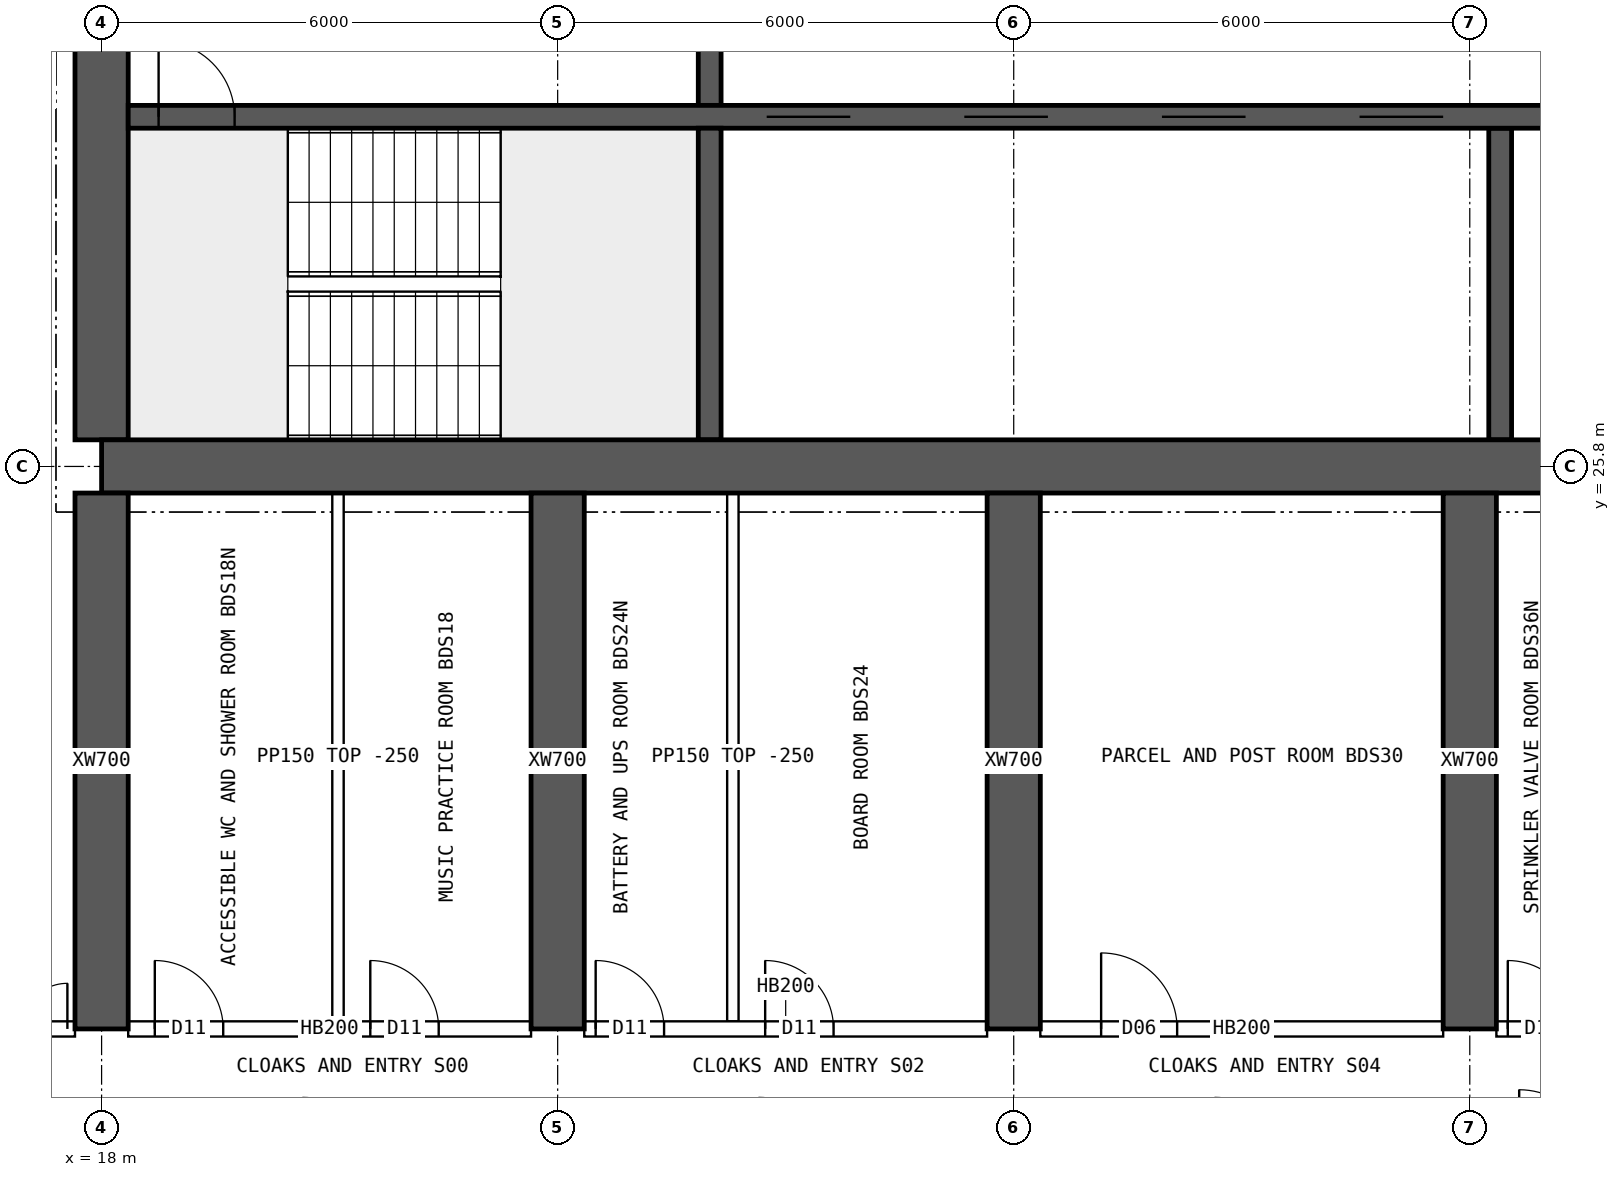
"""IFC4 building model, lengths in metres.
Left out: names, types, materials, properties, quantities, classifications, styles, units other than length and angle.
Written with IfcOpenShell. Run it as: python <this file> out.ifc"""

import sys

from ifc_helpers import new_model, si_unit, direction, frame, frame_2d, origin, place, context, subcontext, project, spatial, rectangle, extrude, element, fill, save


model = new_model("IFC4")
c1 = context("Model", 3, precision=1e-05, world=origin(), true_north=direction((0.0, 1.0)))
c2 = subcontext(c1, "Body", "Model", "MODEL_VIEW")
j1 = project(units=[si_unit("LENGTHUNIT", "METRE"), si_unit("PLANEANGLEUNIT", "RADIAN")], contexts=[c1])
p1 = place(None, origin())
s1 = spatial("IfcSite", under=j1, at=p1, CompositionType="ELEMENT")
p2 = place(p1, origin())
s2 = spatial("IfcBuilding", under=s1, at=p2, CompositionType="ELEMENT")
p3 = place(p2, frame((0.0, 0.0, 246.55)))
s3 = spatial("IfcBuildingStorey", under=s2, at=p3, CompositionType="ELEMENT", Elevation=246.55)
p4 = place(p3, frame((18.0, 25.8, 0.0), z_axis=(0.0, 0.0, 1.0), x_axis=(1.0, 0.0, 0.0)))
e1 = element("IfcWall", 1, at=p4, inside=s3, PredefinedType="SHEAR", context=c2, shape_type="SweptSolid", body=[
    extrude(rectangle(XDim=48.0, YDim=0.7, at=frame_2d((24.0, 0.0))), origin(), (0.0, 0.0, 1.0), 3.75),
])
p5 = place(p3, frame((18.0, 26.15, 0.0), z_axis=(0.0, 0.0, 1.0), x_axis=(0.0, 1.0, 0.0)))
e2 = element("IfcWall", 2, at=p5, inside=s3, PredefinedType="SHEAR", context=c2, shape_type="SweptSolid", body=[
    extrude(rectangle(XDim=11.7, YDim=0.7, at=frame_2d((5.85, 0.0))), origin(), (0.0, 0.0, 1.0), 3.75),
])
p6 = place(p5, frame((5.15, 0.0, 0.0)))
e3 = element("IfcOpeningElement", 3, at=p6, cuts=e2, PredefinedType="OPENING", context=c2, shape_type="SweptSolid", body=[
    extrude(rectangle(XDim=1.2, YDim=2.1, at=frame_2d((0.6, 1.05))), frame((0.0, 0.36, 0.0), z_axis=(0.0, -1.0, 0.0), x_axis=(1.0, 0.0, 0.0)), (0.0, 0.0, 1.0), 0.72),
])
p7 = place(p3, frame((18.35, 30.4, 0.0), z_axis=(0.0, 0.0, 1.0), x_axis=(1.0, 0.0, 0.0)))
e4 = element("IfcWall", 4, at=p7, inside=s3, PredefinedType="SHEAR", context=c2, shape_type="SweptSolid", body=[
    extrude(rectangle(XDim=47.3, YDim=0.3, at=frame_2d((23.65, 0.0))), origin(), (0.0, 0.0, 1.0), 3.75),
])
p8 = place(p7, frame((0.4, 0.0, 0.0)))
e5 = element("IfcOpeningElement", 5, at=p8, cuts=e4, PredefinedType="OPENING", context=c2, shape_type="SweptSolid", body=[
    extrude(rectangle(XDim=1.0, YDim=2.1, at=frame_2d((0.5, 1.05))), frame((0.0, 0.16, 0.0), z_axis=(0.0, -1.0, 0.0), x_axis=(1.0, 0.0, 0.0)), (0.0, 0.0, 1.0), 0.32),
])
p9 = place(p7, frame((45.9, 0.0, 0.0)))
e6 = element("IfcOpeningElement", 6, at=p9, cuts=e4, PredefinedType="OPENING", context=c2, shape_type="SweptSolid", body=[
    extrude(rectangle(XDim=1.0, YDim=2.1, at=frame_2d((0.5, 1.05))), frame((0.0, 0.16, 0.0), z_axis=(0.0, -1.0, 0.0), x_axis=(1.0, 0.0, 0.0)), (0.0, 0.0, 1.0), 0.32),
])
p10 = place(p7, frame((8.4, 0.0, 0.0)))
e7 = element("IfcOpeningElement", 7, at=p10, cuts=e4, PredefinedType="OPENING", context=c2, shape_type="SweptSolid", body=[
    extrude(rectangle(XDim=1.1, YDim=2.1, at=frame_2d((0.55, 1.05))), frame((0.0, 0.16, 0.0), z_axis=(0.0, -1.0, 0.0), x_axis=(1.0, 0.0, 0.0)), (0.0, 0.0, 1.0), 0.32),
])
p11 = place(p7, frame((11.0, 0.0, 0.0)))
e8 = element("IfcOpeningElement", 8, at=p11, cuts=e4, PredefinedType="OPENING", context=c2, shape_type="SweptSolid", body=[
    extrude(rectangle(XDim=1.1, YDim=2.1, at=frame_2d((0.55, 1.05))), frame((0.0, 0.16, 0.0), z_axis=(0.0, -1.0, 0.0), x_axis=(1.0, 0.0, 0.0)), (0.0, 0.0, 1.0), 0.32),
])
p12 = place(p7, frame((13.6, 0.0, 0.0)))
e9 = element("IfcOpeningElement", 9, at=p12, cuts=e4, PredefinedType="OPENING", context=c2, shape_type="SweptSolid", body=[
    extrude(rectangle(XDim=1.1, YDim=2.1, at=frame_2d((0.55, 1.05))), frame((0.0, 0.16, 0.0), z_axis=(0.0, -1.0, 0.0), x_axis=(1.0, 0.0, 0.0)), (0.0, 0.0, 1.0), 0.32),
])
p13 = place(p7, frame((16.2, 0.0, 0.0)))
e10 = element("IfcOpeningElement", 10, at=p13, cuts=e4, PredefinedType="OPENING", context=c2, shape_type="SweptSolid", body=[
    extrude(rectangle(XDim=1.1, YDim=2.1, at=frame_2d((0.55, 1.05))), frame((0.0, 0.16, 0.0), z_axis=(0.0, -1.0, 0.0), x_axis=(1.0, 0.0, 0.0)), (0.0, 0.0, 1.0), 0.32),
])
p14 = place(p7, frame((18.975, 0.0, 0.0)))
e11 = element("IfcOpeningElement", 11, at=p14, cuts=e4, PredefinedType="OPENING", context=c2, shape_type="SweptSolid", body=[
    extrude(rectangle(XDim=0.9, YDim=2.1, at=frame_2d((0.45, 1.05))), frame((0.0, 0.16, 0.0), z_axis=(0.0, -1.0, 0.0), x_axis=(1.0, 0.0, 0.0)), (0.0, 0.0, 1.0), 0.32),
])
p15 = place(p7, frame((24.475, 0.0, 0.0)))
e12 = element("IfcOpeningElement", 12, at=p15, cuts=e4, PredefinedType="OPENING", context=c2, shape_type="SweptSolid", body=[
    extrude(rectangle(XDim=0.9, YDim=2.1, at=frame_2d((0.45, 1.05))), frame((0.0, 0.16, 0.0), z_axis=(0.0, -1.0, 0.0), x_axis=(1.0, 0.0, 0.0)), (0.0, 0.0, 1.0), 0.32),
])
p16 = place(p7, frame((30.267, 0.0, 0.0)))
e13 = element("IfcOpeningElement", 13, at=p16, cuts=e4, PredefinedType="OPENING", context=c2, shape_type="SweptSolid", body=[
    extrude(rectangle(XDim=1.1, YDim=2.1, at=frame_2d((0.55, 1.05))), frame((0.0, 0.16, 0.0), z_axis=(0.0, -1.0, 0.0), x_axis=(1.0, 0.0, 0.0)), (0.0, 0.0, 1.0), 0.32),
])
p17 = place(p7, frame((33.8, 0.0, 0.0)))
e14 = element("IfcOpeningElement", 14, at=p17, cuts=e4, PredefinedType="OPENING", context=c2, shape_type="SweptSolid", body=[
    extrude(rectangle(XDim=1.1, YDim=2.1, at=frame_2d((0.55, 1.05))), frame((0.0, 0.16, 0.0), z_axis=(0.0, -1.0, 0.0), x_axis=(1.0, 0.0, 0.0)), (0.0, 0.0, 1.0), 0.32),
])
p18 = place(p7, frame((37.333, 0.0, 0.0)))
e15 = element("IfcOpeningElement", 15, at=p18, cuts=e4, PredefinedType="OPENING", context=c2, shape_type="SweptSolid", body=[
    extrude(rectangle(XDim=1.1, YDim=2.1, at=frame_2d((0.55, 1.05))), frame((0.0, 0.16, 0.0), z_axis=(0.0, -1.0, 0.0), x_axis=(1.0, 0.0, 0.0)), (0.0, 0.0, 1.0), 0.32),
])
p19 = place(p3, frame((26.0, 26.15, 0.0), z_axis=(0.0, 0.0, 1.0), x_axis=(0.0, 1.0, 0.0)))
e16 = element("IfcWall", 16, at=p19, inside=s3, PredefinedType="SHEAR", context=c2, shape_type="SweptSolid", body=[
    extrude(rectangle(XDim=4.1, YDim=0.3, at=frame_2d((2.05, 0.0))), origin(), (0.0, 0.0, 1.0), 3.75),
])
p20 = place(p3, frame((26.0, 30.55, 0.0), z_axis=(0.0, 0.0, 1.0), x_axis=(0.0, 1.0, 0.0)))
e17 = element("IfcWall", 17, at=p20, inside=s3, PredefinedType="SHEAR", context=c2, shape_type="SweptSolid", body=[
    extrude(rectangle(XDim=3.9, YDim=0.3, at=frame_2d((1.95, 0.0))), origin(), (0.0, 0.0, 1.0), 3.75),
])
p21 = place(p20, frame((1.4, 0.0, 0.0)))
e18 = element("IfcOpeningElement", 18, at=p21, cuts=e17, PredefinedType="OPENING", context=c2, shape_type="SweptSolid", body=[
    extrude(rectangle(XDim=1.2, YDim=2.1, at=frame_2d((0.6, 1.05))), frame((0.0, 0.16, 0.0), z_axis=(0.0, -1.0, 0.0), x_axis=(1.0, 0.0, 0.0)), (0.0, 0.0, 1.0), 0.32),
])
p22 = place(p3, frame((36.4, 26.15, 0.0), z_axis=(0.0, 0.0, 1.0), x_axis=(0.0, 1.0, 0.0)))
e19 = element("IfcWall", 19, at=p22, inside=s3, PredefinedType="SHEAR", context=c2, shape_type="SweptSolid", body=[
    extrude(rectangle(XDim=4.1, YDim=0.3, at=frame_2d((2.05, 0.0))), origin(), (0.0, 0.0, 1.0), 3.75),
])
for number, where, z_axis, x_axis in (
    (20, (18.0, 18.4, 0.0), (0.0, 0.0, 1.0), (0.0, 1.0, 0.0)),
    (21, (24.0, 18.4, 0.0), (0.0, 0.0, 1.0), (0.0, 1.0, 0.0)),
    (22, (30.0, 18.4, 0.0), (0.0, 0.0, 1.0), (0.0, 1.0, 0.0)),
    (23, (36.0, 18.4, 0.0), (0.0, 0.0, 1.0), (0.0, 1.0, 0.0)),
):
    element("IfcWall", number, at=place(p3, frame(where, z_axis=z_axis, x_axis=x_axis)), inside=s3, PredefinedType="SHEAR", context=c2, shape_type="SweptSolid", body=[
        extrude(rectangle(XDim=7.05, YDim=0.7, at=frame_2d((3.525, 0.0))), origin(), (0.0, 0.0, 1.0), 3.75),
    ])
p23 = place(p3, frame((15.6, 18.4, 0.0), z_axis=(0.0, 0.0, 1.0), x_axis=(1.0, 0.0, 0.0)))
e24 = element("IfcWall", 24, at=p23, inside=s3, PredefinedType="SOLIDWALL", context=c2, shape_type="SweptSolid", body=[
    extrude(rectangle(XDim=2.05, YDim=0.2, at=frame_2d((1.025, 0.0))), origin(), (0.0, 0.0, 1.0), 3.5),
])
p24 = place(p23, frame((0.75, 0.0, 0.0)))
e25 = element("IfcOpeningElement", 25, at=p24, cuts=e24, PredefinedType="OPENING", context=c2, shape_type="SweptSolid", body=[
    extrude(rectangle(XDim=1.2, YDim=2.1, at=frame_2d((0.6, 1.05))), frame((0.0, 0.11, 0.0), z_axis=(0.0, -1.0, 0.0), x_axis=(1.0, 0.0, 0.0)), (0.0, 0.0, 1.0), 0.22),
])
p25 = place(p3, frame((18.35, 18.4, 0.0), z_axis=(0.0, 0.0, 1.0), x_axis=(1.0, 0.0, 0.0)))
e26 = element("IfcWall", 26, at=p25, inside=s3, PredefinedType="SOLIDWALL", context=c2, shape_type="SweptSolid", body=[
    extrude(rectangle(XDim=5.3, YDim=0.2, at=frame_2d((2.65, 0.0))), origin(), (0.0, 0.0, 1.0), 3.5),
])
p26 = place(p25, frame((0.35, 0.0, 0.0)))
e27 = element("IfcOpeningElement", 27, at=p26, cuts=e26, PredefinedType="OPENING", context=c2, shape_type="SweptSolid", body=[
    extrude(rectangle(XDim=0.9, YDim=2.1, at=frame_2d((0.45, 1.05))), frame((0.0, 0.11, 0.0), z_axis=(0.0, -1.0, 0.0), x_axis=(1.0, 0.0, 0.0)), (0.0, 0.0, 1.0), 0.22),
])
p27 = place(p25, frame((3.185, 0.0, 0.0)))
e28 = element("IfcOpeningElement", 28, at=p27, cuts=e26, PredefinedType="OPENING", context=c2, shape_type="SweptSolid", body=[
    extrude(rectangle(XDim=0.9, YDim=2.1, at=frame_2d((0.45, 1.05))), frame((0.0, 0.11, 0.0), z_axis=(0.0, -1.0, 0.0), x_axis=(1.0, 0.0, 0.0)), (0.0, 0.0, 1.0), 0.22),
])
p28 = place(p3, frame((24.35, 18.4, 0.0), z_axis=(0.0, 0.0, 1.0), x_axis=(1.0, 0.0, 0.0)))
e29 = element("IfcWall", 29, at=p28, inside=s3, PredefinedType="SOLIDWALL", context=c2, shape_type="SweptSolid", body=[
    extrude(rectangle(XDim=5.3, YDim=0.2, at=frame_2d((2.65, 0.0))), origin(), (0.0, 0.0, 1.0), 3.5),
])
p29 = place(p28, frame((0.15, 0.0, 0.0)))
e30 = element("IfcOpeningElement", 30, at=p29, cuts=e29, PredefinedType="OPENING", context=c2, shape_type="SweptSolid", body=[
    extrude(rectangle(XDim=0.9, YDim=2.1, at=frame_2d((0.45, 1.05))), frame((0.0, 0.11, 0.0), z_axis=(0.0, -1.0, 0.0), x_axis=(1.0, 0.0, 0.0)), (0.0, 0.0, 1.0), 0.22),
])
p30 = place(p28, frame((2.38, 0.0, 0.0)))
e31 = element("IfcOpeningElement", 31, at=p30, cuts=e29, PredefinedType="OPENING", context=c2, shape_type="SweptSolid", body=[
    extrude(rectangle(XDim=0.9, YDim=2.1, at=frame_2d((0.45, 1.05))), frame((0.0, 0.11, 0.0), z_axis=(0.0, -1.0, 0.0), x_axis=(1.0, 0.0, 0.0)), (0.0, 0.0, 1.0), 0.22),
])
p31 = place(p3, frame((30.35, 18.4, 0.0), z_axis=(0.0, 0.0, 1.0), x_axis=(1.0, 0.0, 0.0)))
e32 = element("IfcWall", 32, at=p31, inside=s3, PredefinedType="SOLIDWALL", context=c2, shape_type="SweptSolid", body=[
    extrude(rectangle(XDim=5.3, YDim=0.2, at=frame_2d((2.65, 0.0))), origin(), (0.0, 0.0, 1.0), 3.5),
])
p32 = place(p31, frame((0.8, 0.0, 0.0)))
e33 = element("IfcOpeningElement", 33, at=p32, cuts=e32, PredefinedType="OPENING", context=c2, shape_type="SweptSolid", body=[
    extrude(rectangle(XDim=1.0, YDim=2.1, at=frame_2d((0.5, 1.05))), frame((0.0, 0.11, 0.0), z_axis=(0.0, -1.0, 0.0), x_axis=(1.0, 0.0, 0.0)), (0.0, 0.0, 1.0), 0.22),
])
p33 = place(p3, frame((36.35, 18.4, 0.0), z_axis=(0.0, 0.0, 1.0), x_axis=(1.0, 0.0, 0.0)))
e34 = element("IfcWall", 34, at=p33, inside=s3, PredefinedType="SOLIDWALL", context=c2, shape_type="SweptSolid", body=[
    extrude(rectangle(XDim=5.3, YDim=0.2, at=frame_2d((2.65, 0.0))), origin(), (0.0, 0.0, 1.0), 3.5),
])
p34 = place(p33, frame((0.15, 0.0, 0.0)))
e35 = element("IfcOpeningElement", 35, at=p34, cuts=e34, PredefinedType="OPENING", context=c2, shape_type="SweptSolid", body=[
    extrude(rectangle(XDim=0.9, YDim=2.1, at=frame_2d((0.45, 1.05))), frame((0.0, 0.11, 0.0), z_axis=(0.0, -1.0, 0.0), x_axis=(1.0, 0.0, 0.0)), (0.0, 0.0, 1.0), 0.22),
])
p35 = place(p33, frame((2.34, 0.0, 0.0)))
e36 = element("IfcOpeningElement", 36, at=p35, cuts=e34, PredefinedType="OPENING", context=c2, shape_type="SweptSolid", body=[
    extrude(rectangle(XDim=0.9, YDim=2.1, at=frame_2d((0.45, 1.05))), frame((0.0, 0.11, 0.0), z_axis=(0.0, -1.0, 0.0), x_axis=(1.0, 0.0, 0.0)), (0.0, 0.0, 1.0), 0.22),
])
for number, where, z_axis, x_axis in (
    (37, (21.11, 18.5, 0.0), (0.0, 0.0, 1.0), (0.0, 1.0, 0.0)),
    (38, (26.305, 18.5, 0.0), (0.0, 0.0, 1.0), (0.0, 1.0, 0.0)),
):
    element("IfcWall", number, at=place(p3, frame(where, z_axis=z_axis, x_axis=x_axis)), inside=s3, PredefinedType="PARTITIONING", context=c2, shape_type="SweptSolid", body=[
        extrude(rectangle(XDim=6.95, YDim=0.15, at=frame_2d((3.475, 0.0))), origin(), (0.0, 0.0, 1.0), 3.5),
    ])
p36 = place(p8, origin())
e39 = element("IfcDoor", 39, at=p36, inside=s3, OperationType="SINGLE_SWING_LEFT", PredefinedType="DOOR", context=c2, shape_type="SweptSolid", body=[
    extrude(rectangle(XDim=1.0, YDim=2.1, at=frame_2d((0.5, 1.05))), frame((0.0, 0.025, 0.0), z_axis=(0.0, -1.0, 0.0), x_axis=(1.0, 0.0, 0.0)), (0.0, 0.0, 1.0), 0.05),
])
fill(e5, e39)
p37 = place(p10, origin())
e40 = element("IfcDoor", 40, at=p37, inside=s3, OperationType="DOUBLE_DOOR_SLIDING", PredefinedType="DOOR", context=c2, shape_type="SweptSolid", body=[
    extrude(rectangle(XDim=1.1, YDim=2.1, at=frame_2d((0.55, 1.05))), frame((0.0, 0.025, 0.0), z_axis=(0.0, -1.0, 0.0), x_axis=(1.0, 0.0, 0.0)), (0.0, 0.0, 1.0), 0.05),
])
fill(e7, e40)
p38 = place(p11, origin())
e41 = element("IfcDoor", 41, at=p38, inside=s3, OperationType="DOUBLE_DOOR_SLIDING", PredefinedType="DOOR", context=c2, shape_type="SweptSolid", body=[
    extrude(rectangle(XDim=1.1, YDim=2.1, at=frame_2d((0.55, 1.05))), frame((0.0, 0.025, 0.0), z_axis=(0.0, -1.0, 0.0), x_axis=(1.0, 0.0, 0.0)), (0.0, 0.0, 1.0), 0.05),
])
fill(e8, e41)
p39 = place(p12, origin())
e42 = element("IfcDoor", 42, at=p39, inside=s3, OperationType="DOUBLE_DOOR_SLIDING", PredefinedType="DOOR", context=c2, shape_type="SweptSolid", body=[
    extrude(rectangle(XDim=1.1, YDim=2.1, at=frame_2d((0.55, 1.05))), frame((0.0, 0.025, 0.0), z_axis=(0.0, -1.0, 0.0), x_axis=(1.0, 0.0, 0.0)), (0.0, 0.0, 1.0), 0.05),
])
fill(e9, e42)
p40 = place(p13, origin())
e43 = element("IfcDoor", 43, at=p40, inside=s3, OperationType="DOUBLE_DOOR_SLIDING", PredefinedType="DOOR", context=c2, shape_type="SweptSolid", body=[
    extrude(rectangle(XDim=1.1, YDim=2.1, at=frame_2d((0.55, 1.05))), frame((0.0, 0.025, 0.0), z_axis=(0.0, -1.0, 0.0), x_axis=(1.0, 0.0, 0.0)), (0.0, 0.0, 1.0), 0.05),
])
fill(e10, e43)
p41 = place(p24, origin())
e44 = element("IfcDoor", 44, at=p41, inside=s3, OperationType="DOUBLE_DOOR_SINGLE_SWING", PredefinedType="DOOR", context=c2, shape_type="SweptSolid", body=[
    extrude(rectangle(XDim=1.2, YDim=2.1, at=frame_2d((0.6, 1.05))), frame((0.0, 0.025, 0.0), z_axis=(0.0, -1.0, 0.0), x_axis=(1.0, 0.0, 0.0)), (0.0, 0.0, 1.0), 0.05),
])
fill(e25, e44)
p42 = place(p26, origin())
e45 = element("IfcDoor", 45, at=p42, inside=s3, OperationType="SINGLE_SWING_LEFT", PredefinedType="DOOR", context=c2, shape_type="SweptSolid", body=[
    extrude(rectangle(XDim=0.9, YDim=2.1, at=frame_2d((0.45, 1.05))), frame((0.0, 0.025, 0.0), z_axis=(0.0, -1.0, 0.0), x_axis=(1.0, 0.0, 0.0)), (0.0, 0.0, 1.0), 0.05),
])
fill(e27, e45)
p43 = place(p27, origin())
e46 = element("IfcDoor", 46, at=p43, inside=s3, OperationType="SINGLE_SWING_LEFT", PredefinedType="DOOR", context=c2, shape_type="SweptSolid", body=[
    extrude(rectangle(XDim=0.9, YDim=2.1, at=frame_2d((0.45, 1.05))), frame((0.0, 0.025, 0.0), z_axis=(0.0, -1.0, 0.0), x_axis=(1.0, 0.0, 0.0)), (0.0, 0.0, 1.0), 0.05),
])
fill(e28, e46)
p44 = place(p29, origin())
e47 = element("IfcDoor", 47, at=p44, inside=s3, OperationType="SINGLE_SWING_LEFT", PredefinedType="DOOR", context=c2, shape_type="SweptSolid", body=[
    extrude(rectangle(XDim=0.9, YDim=2.1, at=frame_2d((0.45, 1.05))), frame((0.0, 0.025, 0.0), z_axis=(0.0, -1.0, 0.0), x_axis=(1.0, 0.0, 0.0)), (0.0, 0.0, 1.0), 0.05),
])
fill(e30, e47)
p45 = place(p30, origin())
e48 = element("IfcDoor", 48, at=p45, inside=s3, OperationType="SINGLE_SWING_LEFT", PredefinedType="DOOR", context=c2, shape_type="SweptSolid", body=[
    extrude(rectangle(XDim=0.9, YDim=2.1, at=frame_2d((0.45, 1.05))), frame((0.0, 0.025, 0.0), z_axis=(0.0, -1.0, 0.0), x_axis=(1.0, 0.0, 0.0)), (0.0, 0.0, 1.0), 0.05),
])
fill(e31, e48)
p46 = place(p32, origin())
e49 = element("IfcDoor", 49, at=p46, inside=s3, OperationType="SINGLE_SWING_LEFT", PredefinedType="DOOR", context=c2, shape_type="SweptSolid", body=[
    extrude(rectangle(XDim=1.0, YDim=2.1, at=frame_2d((0.5, 1.05))), frame((0.0, 0.025, 0.0), z_axis=(0.0, -1.0, 0.0), x_axis=(1.0, 0.0, 0.0)), (0.0, 0.0, 1.0), 0.05),
])
fill(e33, e49)
p47 = place(p34, origin())
e50 = element("IfcDoor", 50, at=p47, inside=s3, OperationType="SINGLE_SWING_LEFT", PredefinedType="DOOR", context=c2, shape_type="SweptSolid", body=[
    extrude(rectangle(XDim=0.9, YDim=2.1, at=frame_2d((0.45, 1.05))), frame((0.0, 0.025, 0.0), z_axis=(0.0, -1.0, 0.0), x_axis=(1.0, 0.0, 0.0)), (0.0, 0.0, 1.0), 0.05),
])
fill(e35, e50)
save(model, sys.argv[1])
